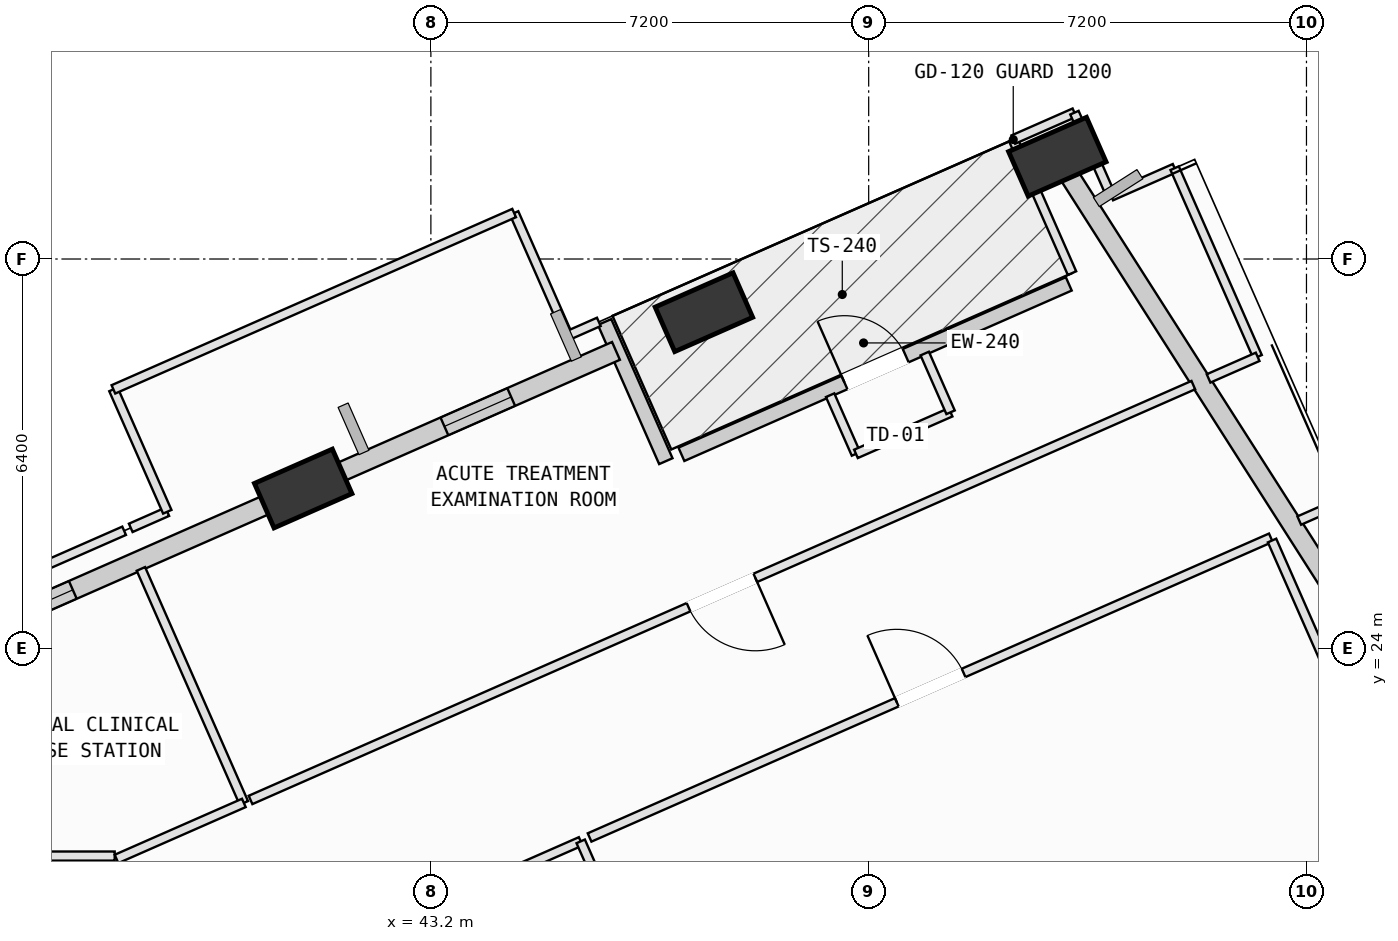
"""IFC4 building model, lengths in metres.
Left out: names, types, materials, properties, quantities, classifications, styles, units other than length and angle.
Written with IfcOpenShell. Run it as: python <this file> out.ifc"""

import sys

from ifc_helpers import new_model, si_unit, direction, frame, frame_2d, origin, origin_2d, place, context, subcontext, project, spatial, rectangle, extrude, element, fill, save


model = new_model("IFC4")
c1 = context("Model", 3, precision=1e-05, world=origin(), true_north=direction((0.0, 1.0)))
c2 = subcontext(c1, "Body", "Model", "MODEL_VIEW")
j1 = project(units=[si_unit("LENGTHUNIT", "METRE"), si_unit("PLANEANGLEUNIT", "RADIAN")], contexts=[c1])
p1 = place(None, origin())
s1 = spatial("IfcSite", under=j1, at=p1, CompositionType="ELEMENT")
p2 = place(p1, origin())
s2 = spatial("IfcBuilding", under=s1, at=p2, CompositionType="ELEMENT")
p3 = place(p2, frame((0.0, 0.0, 124.4)))
s3 = spatial("IfcBuildingStorey", under=s2, at=p3, CompositionType="ELEMENT", Elevation=124.4)
p4 = place(p3, frame((53.502, 32.083, 0.002), z_axis=(-0.030732547572, 0.081973745701, 0.99616053703), x_axis=(-0.716218702977, -0.696984649229, 0.035258591087)))
e1 = element("IfcColumn", 1, at=p4, inside=s3, PredefinedType="COLUMN", context=c2, shape_type="SweptSolid", body=[
    extrude(rectangle(XDim=1.4, YDim=0.8, at=origin_2d()), origin(), (0.0, 0.0, 1.0), 4.012),
])
p5 = place(p3, frame((47.69, 29.525, 0.002), z_axis=(-0.02000000171, 0.058109761067, 0.998109841451), x_axis=(-0.734662083576, -0.677981575356, 0.024750887525)))
e2 = element("IfcColumn", 2, at=p5, inside=s3, PredefinedType="COLUMN", context=c2, shape_type="SweptSolid", body=[
    extrude(rectangle(XDim=1.4, YDim=0.8, at=origin_2d()), origin(), (0.0, 0.0, 1.0), 4.004),
])
p6 = place(p3, frame((41.1, 26.625, 0.002), z_axis=(-0.007815657452, 0.031018390514, 0.999488256534), x_axis=(-0.789216489243, -0.613979935335, 0.012883016466)))
e3 = element("IfcColumn", 3, at=p6, inside=s3, PredefinedType="COLUMN", context=c2, shape_type="SweptSolid", body=[
    extrude(rectangle(XDim=1.4, YDim=0.8, at=origin_2d()), origin(), (0.0, 0.0, 1.0), 3.998),
])
p7 = place(p3, frame((47.32, 27.188, 0.0), z_axis=(0.0, 0.0, 1.0), x_axis=(0.915306756623, 0.402757422378, 0.0)))
e4 = element("IfcWall", 4, at=p7, inside=s3, PredefinedType="SOLIDWALL", context=c2, shape_type="SweptSolid", body=[
    extrude(rectangle(XDim=6.96, YDim=0.24, at=frame_2d((3.48, 0.0))), origin(), (0.0, 0.0, 1.0), 2.945),
])
p8 = place(p7, frame((2.93, 0.0, 0.0)))
e5 = element("IfcOpeningElement", 5, at=p8, cuts=e4, PredefinedType="OPENING", context=c2, shape_type="SweptSolid", body=[
    extrude(rectangle(XDim=1.1, YDim=2.15, at=frame_2d((0.55, 1.075))), frame((0.0, 0.13, 0.0), z_axis=(0.0, -1.0, 0.0), x_axis=(1.0, 0.0, 0.0)), (0.0, 0.0, 1.0), 0.26),
])
p9 = place(p3, frame((46.057, 29.364, 0.0), z_axis=(0.0, 0.0, 1.0), x_axis=(0.402810607767, -0.915283351903, 0.0)))
e6 = element("IfcWall", 6, at=p9, inside=s3, PredefinedType="SOLIDWALL", context=c2, shape_type="SweptSolid", body=[
    extrude(rectangle(XDim=2.5, YDim=0.24, at=frame_2d((1.25, 0.0))), origin(), (0.0, 0.0, 1.0), 3.165),
])
p10 = place(p3, frame((53.676, 31.81, 0.0), z_axis=(0.0, 0.0, 1.0), x_axis=(0.537911832646, -0.84300110338, 0.0)))
e7 = element("IfcWall", 7, at=p10, inside=s3, PredefinedType="SOLIDWALL", context=c2, shape_type="SweptSolid", body=[
    extrude(rectangle(XDim=8.838, YDim=0.32, at=frame_2d((4.419, 0.0))), origin(), (0.0, 0.0, 1.0), 3.165),
])
p11 = place(p3, frame((41.56, 26.828, 0.0), z_axis=(0.0, 0.0, 1.0), x_axis=(0.915304479766, 0.402762596726, 0.0)))
e8 = element("IfcWall", 8, at=p11, inside=s3, PredefinedType="SOLIDWALL", context=c2, shape_type="SweptSolid", body=[
    extrude(rectangle(XDim=5.117, YDim=0.32, at=frame_2d((2.559, 0.0))), origin(), (0.0, 0.0, 1.0), 3.145),
])
p12 = place(p11, frame((2.034, 0.0, 0.75)))
e9 = element("IfcOpeningElement", 9, at=p12, cuts=e8, PredefinedType="OPENING", context=c2, shape_type="SweptSolid", body=[
    extrude(rectangle(XDim=1.2, YDim=1.75, at=frame_2d((0.6, 0.875))), frame((0.0, 0.17, 0.0), z_axis=(0.0, -1.0, 0.0), x_axis=(1.0, 0.0, 0.0)), (0.0, 0.0, 1.0), 0.34),
])
p13 = place(p3, frame((34.974, 23.93, 0.0), z_axis=(0.0, 0.0, 1.0), x_axis=(0.915298223489, 0.402776814227, 0.0)))
e10 = element("IfcWall", 10, at=p13, inside=s3, PredefinedType="SOLIDWALL", context=c2, shape_type="SweptSolid", body=[
    extrude(rectangle(XDim=6.211, YDim=0.32, at=frame_2d((3.105, 0.0))), origin(), (0.0, 0.0, 1.0), 3.165),
])
p14 = place(p13, frame((0.953, 0.0, 0.75)))
e11 = element("IfcOpeningElement", 11, at=p14, cuts=e10, PredefinedType="OPENING", context=c2, shape_type="SweptSolid", body=[
    extrude(rectangle(XDim=1.6, YDim=1.95, at=frame_2d((0.8, 0.975))), frame((0.0, 0.17, 0.0), z_axis=(0.0, -1.0, 0.0), x_axis=(1.0, 0.0, 0.0)), (0.0, 0.0, 1.0), 0.34),
])
p15 = place(p3, frame((36.5, 16.79, 0.0), z_axis=(0.0, 0.0, 1.0), x_axis=(0.915322583173, 0.402721453034, 0.0)))
e12 = element("IfcWall", 12, at=p15, inside=s3, PredefinedType="PARTITIONING", context=c2, shape_type="SweptSolid", body=[
    extrude(rectangle(XDim=10.012, YDim=0.15, at=frame_2d((5.006, 0.0))), origin(), (0.0, 0.0, 1.0), 2.965),
])
p16 = place(p15, frame((4.406, 0.0, 0.0)))
e13 = element("IfcOpeningElement", 13, at=p16, cuts=e12, PredefinedType="OPENING", context=c2, shape_type="SweptSolid", body=[
    extrude(rectangle(XDim=1.2, YDim=2.15, at=frame_2d((0.6, 1.075))), frame((0.0, 0.085, 0.0), z_axis=(0.0, -1.0, 0.0), x_axis=(1.0, 0.0, 0.0)), (0.0, 0.0, 1.0), 0.17),
])
p17 = place(p3, frame((45.664, 20.822, 0.0), z_axis=(0.0, 0.0, 1.0), x_axis=(0.402718182195, -0.915324022262, 0.0)))
e14 = element("IfcWall", 14, at=p17, inside=s3, PredefinedType="PARTITIONING", context=c2, shape_type="SweptSolid", body=[
    extrude(rectangle(XDim=13.615, YDim=0.15, at=frame_2d((6.807, 0.0))), origin(), (0.0, 0.0, 1.0), 3.78),
])
p18 = place(p3, frame((45.81, 20.886, 0.0), z_axis=(0.0, 0.0, 1.0), x_axis=(0.915307973906, 0.402754655969, 0.0)))
e15 = element("IfcWall", 15, at=p18, inside=s3, PredefinedType="PARTITIONING", context=c2, shape_type="SweptSolid", body=[
    extrude(rectangle(XDim=12.24, YDim=0.15, at=frame_2d((6.12, 0.0))), origin(), (0.0, 0.0, 1.0), 3.78),
])
p19 = place(p18, frame((5.52, 0.0, 0.0)))
e16 = element("IfcOpeningElement", 16, at=p19, cuts=e15, PredefinedType="OPENING", context=c2, shape_type="SweptSolid", body=[
    extrude(rectangle(XDim=1.2, YDim=2.15, at=frame_2d((0.6, 1.075))), frame((0.0, 0.085, 0.0), z_axis=(0.0, -1.0, 0.0), x_axis=(1.0, 0.0, 0.0)), (0.0, 0.0, 1.0), 0.17),
])
p20 = place(p3, frame((57.034, 25.77, 0.0), z_axis=(0.0, 0.0, 1.0), x_axis=(0.402780146141, -0.915296757273, 0.0)))
e17 = element("IfcWall", 17, at=p20, inside=s3, PredefinedType="PARTITIONING", context=c2, shape_type="SweptSolid", body=[
    extrude(rectangle(XDim=10.835, YDim=0.15, at=frame_2d((5.417, 0.0))), origin(), (0.0, 0.0, 1.0), 3.78),
])
p21 = place(p3, frame((38.0, 20.58, 0.0), z_axis=(0.0, 0.0, 1.0), x_axis=(-1.0, 0.0, 0.0)))
e18 = element("IfcWall", 18, at=p21, inside=s3, PredefinedType="PARTITIONING", context=c2, shape_type="SweptSolid", body=[
    extrude(rectangle(XDim=9.093, YDim=0.15, at=frame_2d((4.546, 0.0))), origin(), (0.0, 0.0, 1.0), 3.365),
])
p22 = place(p21, frame((3.947, 0.0, 0.0)))
e19 = element("IfcOpeningElement", 19, at=p22, cuts=e18, PredefinedType="OPENING", context=c2, shape_type="SweptSolid", body=[
    extrude(rectangle(XDim=1.2, YDim=2.15, at=frame_2d((0.6, 1.075))), frame((0.0, 0.085, 0.0), z_axis=(0.0, -1.0, 0.0), x_axis=(1.0, 0.0, 0.0)), (0.0, 0.0, 1.0), 0.17),
])
p23 = place(p3, frame((28.43, 21.651, 0.0), z_axis=(0.0, 0.0, 1.0), x_axis=(0.915314693601, 0.402739384314, 0.0)))
e20 = element("IfcWall", 20, at=p23, inside=s3, PredefinedType="PARTITIONING", context=c2, shape_type="SweptSolid", body=[
    extrude(rectangle(XDim=10.625, YDim=0.15, at=frame_2d((5.312, 0.0))), origin(), (0.0, 0.0, 1.0), 3.78),
])
p24 = place(p3, frame((38.431, 25.303, 0.0), z_axis=(0.0, 0.0, 1.0), x_axis=(0.402660781554, -0.915349274866, 0.0)))
e21 = element("IfcWall", 21, at=p24, inside=s3, PredefinedType="PARTITIONING", context=c2, shape_type="SweptSolid", body=[
    extrude(rectangle(XDim=4.205, YDim=0.15, at=frame_2d((2.103, 0.0))), origin(), (0.0, 0.0, 1.0), 3.78),
])
p25 = place(p3, frame((40.124, 21.454, 0.0), z_axis=(0.0, 0.0, 1.0), x_axis=(-0.915349649127, -0.402659930763, 0.0)))
e22 = element("IfcWall", 22, at=p25, inside=s3, PredefinedType="PARTITIONING", context=c2, shape_type="SweptSolid", body=[
    extrude(rectangle(XDim=2.288, YDim=0.15, at=frame_2d((1.144, 0.0))), origin(), (0.0, 0.0, 1.0), 3.78),
])
p26 = place(p3, frame((44.569, 31.156, 0.0), z_axis=(0.0, 0.0, 1.0), x_axis=(0.40268655299, -0.915337937617, 0.0)))
e23 = element("IfcWall", 23, at=p26, inside=s3, PredefinedType="PARTITIONING", context=c2, shape_type="SweptSolid", body=[
    extrude(rectangle(XDim=2.2, YDim=0.15, at=frame_2d((1.1, 0.0))), origin(), (0.0, 0.0, 1.0), 3.78),
])
p27 = place(p3, frame((45.455, 29.142, 0.0), z_axis=(0.0, 0.0, 1.0), x_axis=(0.914735843539, 0.404052393317, 0.0)))
e24 = element("IfcWall", 24, at=p27, inside=s3, PredefinedType="PARTITIONING", context=c2, shape_type="SweptSolid", body=[
    extrude(rectangle(XDim=0.554, YDim=0.15, at=frame_2d((0.277, 0.0))), origin(), (0.0, 0.0, 1.0), 3.145),
])
p28 = place(p3, frame((49.766, 28.16, 0.0), z_axis=(0.0, 0.0, 1.0), x_axis=(0.402955906801, -0.915219392918, 0.0)))
e25 = element("IfcWall", 25, at=p28, inside=s3, PredefinedType="PARTITIONING", context=c2, shape_type="SweptSolid", body=[
    extrude(rectangle(XDim=1.054, YDim=0.15, at=frame_2d((0.527, 0.0))), origin(), (0.0, 0.0, 1.0), 3.78),
])
p29 = place(p3, frame((50.191, 27.195, 0.0), z_axis=(0.0, 0.0, 1.0), x_axis=(0.915503423678, 0.402310180377, 0.0)))
e26 = element("IfcWall", 26, at=p29, inside=s3, PredefinedType="PARTITIONING", context=c2, shape_type="SweptSolid", body=[
    extrude(rectangle(XDim=1.7, YDim=0.15, at=frame_2d((0.85, 0.0))), origin(), (0.0, 0.0, 1.0), 3.78),
])
p30 = place(p3, frame((51.747, 27.879, 0.0), z_axis=(0.0, 0.0, 1.0), x_axis=(-0.40272311038, 0.915321853976, 0.0)))
e27 = element("IfcWall", 27, at=p30, inside=s3, PredefinedType="PARTITIONING", context=c2, shape_type="SweptSolid", body=[
    extrude(rectangle(XDim=1.055, YDim=0.15, at=frame_2d((0.528, 0.0))), origin(), (0.0, 0.0, 1.0), 3.78),
])
p31 = place(p3, frame((53.744, 30.168, 0.0), z_axis=(0.0, 0.0, 1.0), x_axis=(-0.402585141552, 0.915382545061, 0.0)))
e28 = element("IfcWall", 28, at=p31, inside=s3, PredefinedType="PARTITIONING", context=c2, shape_type="SweptSolid", body=[
    extrude(rectangle(XDim=2.399, YDim=0.15, at=frame_2d((1.199, 0.0))), origin(), (0.0, 0.0, 1.0), 3.78),
])
p32 = place(p3, frame((52.778, 32.364, 0.0), z_axis=(0.0, 0.0, 1.0), x_axis=(0.9152167395, 0.402961933362, 0.0)))
e29 = element("IfcWall", 29, at=p32, inside=s3, PredefinedType="PARTITIONING", context=c2, shape_type="SweptSolid", body=[
    extrude(rectangle(XDim=1.099, YDim=0.15, at=frame_2d((0.55, 0.0))), origin(), (0.0, 0.0, 1.0), 2.945),
])
p33 = place(p3, frame((53.784, 32.807, 0.0), z_axis=(0.0, 0.0, 1.0), x_axis=(0.403267558241, -0.915082114605, 0.0)))
e30 = element("IfcWall", 30, at=p33, inside=s3, PredefinedType="PARTITIONING", context=c2, shape_type="SweptSolid", body=[
    extrude(rectangle(XDim=1.5, YDim=0.15, at=frame_2d((0.75, 0.0))), origin(), (0.0, 0.0, 1.0), 3.165),
])
p34 = place(p3, frame((54.389, 31.434, 0.0), z_axis=(0.0, 0.0, 1.0), x_axis=(0.914973625202, 0.403513649317, 0.0)))
e31 = element("IfcWall", 31, at=p34, inside=s3, PredefinedType="PARTITIONING", context=c2, shape_type="SweptSolid", body=[
    extrude(rectangle(XDim=1.14, YDim=0.15, at=frame_2d((0.57, 0.0))), origin(), (0.0, 0.0, 1.0), 3.78),
])
p35 = place(p3, frame((55.432, 31.894, 0.0), z_axis=(0.0, 0.0, 1.0), x_axis=(0.402714480017, -0.915325651112, 0.0)))
e32 = element("IfcWall", 32, at=p35, inside=s3, PredefinedType="PARTITIONING", context=c2, shape_type="SweptSolid", body=[
    extrude(rectangle(XDim=3.39, YDim=0.15, at=frame_2d((1.695, 0.0))), origin(), (0.0, 0.0, 1.0), 3.78),
])
p36 = place(p3, frame((56.797, 28.791, 0.0), z_axis=(0.0, 0.0, 1.0), x_axis=(-0.915380344353, -0.402590145399, 0.0)))
e33 = element("IfcWall", 33, at=p36, inside=s3, PredefinedType="PARTITIONING", context=c2, shape_type="SweptSolid", body=[
    extrude(rectangle(XDim=0.882, YDim=0.15, at=frame_2d((0.441, 0.0))), origin(), (0.0, 0.0, 1.0), 3.78),
])
p37 = place(p3, frame((55.739, 28.326, 0.0), z_axis=(0.0, 0.0, 1.0), x_axis=(-0.915298880847, -0.402775320396, 0.0)))
e34 = element("IfcWall", 34, at=p37, inside=s3, PredefinedType="PARTITIONING", context=c2, shape_type="SweptSolid", body=[
    extrude(rectangle(XDim=16.94, YDim=0.15, at=frame_2d((8.47, 0.0))), origin(), (0.0, 0.0, 1.0), 2.945),
])
p38 = place(p37, frame((7.87, 0.0, 0.0)))
e35 = element("IfcOpeningElement", 35, at=p38, cuts=e34, PredefinedType="OPENING", context=c2, shape_type="SweptSolid", body=[
    extrude(rectangle(XDim=1.2, YDim=2.15, at=frame_2d((0.6, 1.075))), frame((0.0, 0.085, 0.0), z_axis=(0.0, -1.0, 0.0), x_axis=(1.0, 0.0, 0.0)), (0.0, 0.0, 1.0), 0.17),
])
p39 = place(p3, frame((38.264, 25.978, 0.0), z_axis=(0.0, 0.0, 1.0), x_axis=(0.915079211877, 0.403274144958, 0.0)))
e36 = element("IfcWall", 36, at=p39, inside=s3, PredefinedType="PARTITIONING", context=c2, shape_type="SweptSolid", body=[
    extrude(rectangle(XDim=0.657, YDim=0.15, at=frame_2d((0.328, 0.0))), origin(), (0.0, 0.0, 1.0), 3.78),
])
p40 = place(p3, frame((38.865, 26.243, 0.0), z_axis=(0.0, 0.0, 1.0), x_axis=(-0.402809288305, 0.915283932589, 0.0)))
e37 = element("IfcWall", 37, at=p40, inside=s3, PredefinedType="PARTITIONING", context=c2, shape_type="SweptSolid", body=[
    extrude(rectangle(XDim=2.199, YDim=0.15, at=frame_2d((1.1, 0.0))), origin(), (0.0, 0.0, 1.0), 3.78),
])
p41 = place(p3, frame((37.979, 28.256, 0.0), z_axis=(0.0, 0.0, 1.0), x_axis=(0.915301532005, 0.402769295638, 0.0)))
e38 = element("IfcWall", 38, at=p41, inside=s3, PredefinedType="PARTITIONING", context=c2, shape_type="SweptSolid", body=[
    extrude(rectangle(XDim=7.2, YDim=0.15, at=frame_2d((3.6, 0.0))), origin(), (0.0, 0.0, 1.0), 3.78),
])
p42 = place(p3, frame((57.481, 26.098, 0.0), z_axis=(0.0, 0.0, 1.0), x_axis=(0.915086186066, 0.403258319283, 0.0)))
e39 = element("IfcWall", 39, at=p42, inside=s3, PredefinedType="PARTITIONING", context=c2, shape_type="SweptSolid", body=[
    extrude(rectangle(XDim=0.819, YDim=0.15, at=frame_2d((0.409, 0.0))), origin(), (0.0, 0.0, 1.0), 3.78),
])
p43 = place(p8, origin())
e40 = element("IfcDoor", 40, at=p43, inside=s3, OperationType="SINGLE_SWING_LEFT", PredefinedType="DOOR", context=c2, shape_type="SweptSolid", body=[
    extrude(rectangle(XDim=1.1, YDim=2.15, at=frame_2d((0.55, 1.075))), frame((0.0, 0.025, 0.0), z_axis=(0.0, -1.0, 0.0), x_axis=(1.0, 0.0, 0.0)), (0.0, 0.0, 1.0), 0.05),
])
fill(e5, e40)
p44 = place(p12, origin())
e41 = element("IfcWindow", 41, at=p44, inside=s3, PartitioningType="SINGLE_PANEL", PredefinedType="WINDOW", context=c2, shape_type="SweptSolid", body=[
    extrude(rectangle(XDim=1.2, YDim=1.75, at=frame_2d((0.6, 0.875))), frame((0.0, 0.03, 0.0), z_axis=(0.0, -1.0, 0.0), x_axis=(1.0, 0.0, 0.0)), (0.0, 0.0, 1.0), 0.06),
])
fill(e9, e41)
p45 = place(p14, origin())
e42 = element("IfcWindow", 42, at=p45, inside=s3, PartitioningType="SINGLE_PANEL", PredefinedType="WINDOW", context=c2, shape_type="SweptSolid", body=[
    extrude(rectangle(XDim=1.6, YDim=1.95, at=frame_2d((0.8, 0.975))), frame((0.0, 0.03, 0.0), z_axis=(0.0, -1.0, 0.0), x_axis=(1.0, 0.0, 0.0)), (0.0, 0.0, 1.0), 0.06),
])
fill(e11, e42)
p46 = place(p19, origin())
e43 = element("IfcDoor", 43, at=p46, inside=s3, OperationType="SINGLE_SWING_LEFT", PredefinedType="DOOR", context=c2, shape_type="SweptSolid", body=[
    extrude(rectangle(XDim=1.2, YDim=2.15, at=frame_2d((0.6, 1.075))), frame((0.0, 0.025, 0.0), z_axis=(0.0, -1.0, 0.0), x_axis=(1.0, 0.0, 0.0)), (0.0, 0.0, 1.0), 0.05),
])
fill(e16, e43)
p47 = place(p38, origin())
e44 = element("IfcDoor", 44, at=p47, inside=s3, OperationType="SINGLE_SWING_LEFT", PredefinedType="DOOR", context=c2, shape_type="SweptSolid", body=[
    extrude(rectangle(XDim=1.2, YDim=2.15, at=frame_2d((0.6, 1.075))), frame((0.0, 0.025, 0.0), z_axis=(0.0, -1.0, 0.0), x_axis=(1.0, 0.0, 0.0)), (0.0, 0.0, 1.0), 0.05),
])
fill(e35, e44)
save(model, sys.argv[1])
